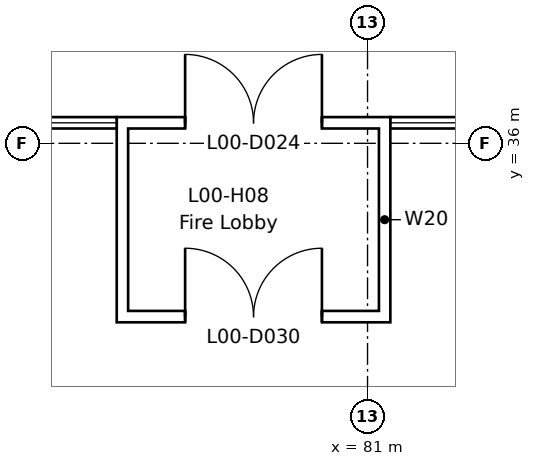
"""IFC4 building model, lengths in metres.
Left out: names, types, materials, properties, quantities, classifications, styles, units other than length and angle.
Written with IfcOpenShell. Run it as: python <this file> out.ifc"""

import sys

from ifc_helpers import new_model, si_unit, direction, frame, frame_2d, origin, place, context, subcontext, project, spatial, rectangle, extrude, element, fill, save


model = new_model("IFC4")
c1 = context("Model", 3, precision=1e-05, world=origin(), true_north=direction((0.0, 1.0)))
c2 = subcontext(c1, "Body", "Model", "MODEL_VIEW")
j1 = project(units=[si_unit("LENGTHUNIT", "METRE"), si_unit("PLANEANGLEUNIT", "RADIAN")], contexts=[c1])
p1 = place(None, origin())
s1 = spatial("IfcSite", under=j1, at=p1, CompositionType="ELEMENT")
p2 = place(p1, origin())
s2 = spatial("IfcBuilding", under=s1, at=p2, CompositionType="ELEMENT")
p3 = place(p2, origin())
s3 = spatial("IfcBuildingStorey", under=s2, at=p3, CompositionType="ELEMENT", Elevation=0.0)
p4 = place(p3, frame((77.7, 36.27, 0.0), z_axis=(0.0, 0.0, 1.0), x_axis=(1.0, 0.0, 0.0)))
e1 = element("IfcWall", 1, at=p4, inside=s3, PredefinedType="STANDARD", context=c2, shape_type="SweptSolid", body=[
    extrude(rectangle(XDim=3.6, YDim=0.15, at=frame_2d((1.8, 0.0))), origin(), (0.0, 0.0, 1.0), 4.8),
])
p5 = place(p4, frame((0.9, 0.0, 0.0)))
e2 = element("IfcOpeningElement", 2, at=p5, cuts=e1, PredefinedType="OPENING", context=c2, shape_type="SweptSolid", body=[
    extrude(rectangle(XDim=1.8, YDim=2.4, at=frame_2d((0.9, 1.2))), frame((0.0, 0.085, 0.0), z_axis=(0.0, -1.0, 0.0), x_axis=(1.0, 0.0, 0.0)), (0.0, 0.0, 1.0), 0.17),
])
for number, where, z_axis, x_axis in (
    (3, (77.775, 33.795, 0.0), (0.0, 0.0, 1.0), (0.0, 1.0, 0.0)),
    (4, (81.225, 33.795, 0.0), (0.0, 0.0, 1.0), (0.0, 1.0, 0.0)),
):
    element("IfcWall", number, at=place(p3, frame(where, z_axis=z_axis, x_axis=x_axis)), inside=s3, PredefinedType="STANDARD", context=c2, shape_type="SweptSolid", body=[
        extrude(rectangle(XDim=2.4, YDim=0.15, at=frame_2d((1.2, 0.0))), origin(), (0.0, 0.0, 1.0), 3.0),
    ])
p6 = place(p3, frame((77.7, 33.72, 0.0), z_axis=(0.0, 0.0, 1.0), x_axis=(1.0, 0.0, 0.0)))
e5 = element("IfcWall", 5, at=p6, inside=s3, PredefinedType="STANDARD", context=c2, shape_type="SweptSolid", body=[
    extrude(rectangle(XDim=3.6, YDim=0.15, at=frame_2d((1.8, 0.0))), origin(), (0.0, 0.0, 1.0), 3.0),
])
p7 = place(p6, frame((0.9, 0.0, 0.0)))
e6 = element("IfcOpeningElement", 6, at=p7, cuts=e5, PredefinedType="OPENING", context=c2, shape_type="SweptSolid", body=[
    extrude(rectangle(XDim=1.8, YDim=2.4, at=frame_2d((0.9, 1.2))), frame((0.0, 0.085, 0.0), z_axis=(0.0, -1.0, 0.0), x_axis=(1.0, 0.0, 0.0)), (0.0, 0.0, 1.0), 0.17),
])
p8 = place(p5, origin())
e7 = element("IfcDoor", 7, at=p8, inside=s3, OperationType="DOUBLE_DOOR_SINGLE_SWING", PredefinedType="DOOR", context=c2, shape_type="SweptSolid", body=[
    extrude(rectangle(XDim=1.8, YDim=2.4, at=frame_2d((0.9, 1.2))), frame((0.0, 0.025, 0.0), z_axis=(0.0, -1.0, 0.0), x_axis=(1.0, 0.0, 0.0)), (0.0, 0.0, 1.0), 0.05),
])
fill(e2, e7)
p9 = place(p7, origin())
e8 = element("IfcDoor", 8, at=p9, inside=s3, OperationType="DOUBLE_DOOR_SINGLE_SWING", PredefinedType="DOOR", context=c2, shape_type="SweptSolid", body=[
    extrude(rectangle(XDim=1.8, YDim=2.4, at=frame_2d((0.9, 1.2))), frame((0.0, 0.025, 0.0), z_axis=(0.0, -1.0, 0.0), x_axis=(1.0, 0.0, 0.0)), (0.0, 0.0, 1.0), 0.05),
])
fill(e6, e8)
save(model, sys.argv[1])
